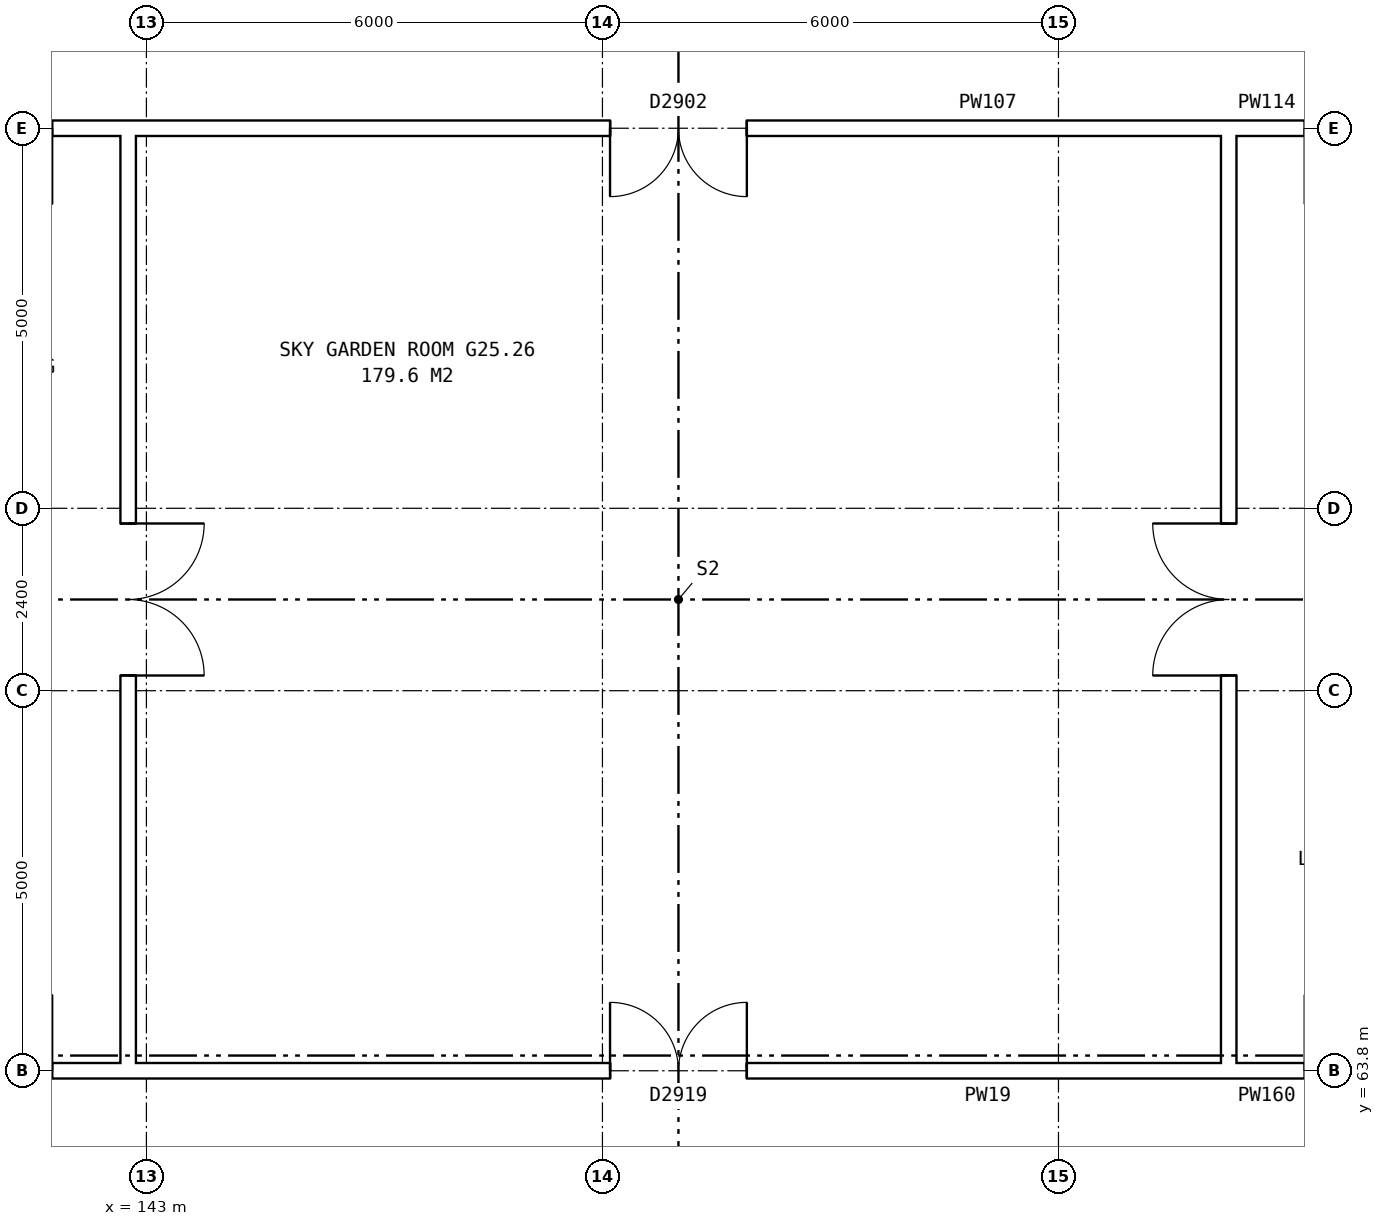
"""IFC4 building model, lengths in metres.
Left out: names, types, materials, properties, quantities, classifications, styles, units other than length and angle.
Written with IfcOpenShell. Run it as: python <this file> out.ifc"""

import sys

from ifc_helpers import new_model, si_unit, direction, frame, frame_2d, origin, place, context, subcontext, project, spatial, rectangle, extrude, element, fill, save


model = new_model("IFC4")
c1 = context("Model", 3, precision=1e-05, world=origin(), true_north=direction((0.0, 1.0)))
c2 = subcontext(c1, "Body", "Model", "MODEL_VIEW")
j1 = project(units=[si_unit("LENGTHUNIT", "METRE"), si_unit("PLANEANGLEUNIT", "RADIAN")], contexts=[c1])
p1 = place(None, origin())
s1 = spatial("IfcSite", under=j1, at=p1, CompositionType="ELEMENT")
p2 = place(p1, origin())
s2 = spatial("IfcBuilding", under=s1, at=p2, CompositionType="ELEMENT")
p3 = place(p2, frame((0.0, 0.0, 90.2)))
s3 = spatial("IfcBuildingStorey", under=s2, at=p3, CompositionType="ELEMENT", Elevation=90.2)
p4 = place(p3, frame((142.76, 63.9, 0.0), z_axis=(0.0, 0.0, 1.0), x_axis=(0.0, 1.0, 0.0)))
e1 = element("IfcWall", 1, at=p4, inside=s3, PredefinedType="PARTITIONING", context=c2, shape_type="SweptSolid", body=[
    extrude(rectangle(XDim=12.2, YDim=0.2, at=frame_2d((6.1, 0.0))), origin(), (0.0, 0.0, 1.0), 5.6),
])
p5 = place(p4, frame((5.1, 0.0, 0.0)))
e2 = element("IfcOpeningElement", 2, at=p5, cuts=e1, PredefinedType="OPENING", context=c2, shape_type="SweptSolid", body=[
    extrude(rectangle(XDim=2.0, YDim=2.1, at=frame_2d((1.0, 1.05))), frame((0.0, 0.11, 0.0), z_axis=(0.0, -1.0, 0.0), x_axis=(1.0, 0.0, 0.0)), (0.0, 0.0, 1.0), 0.22),
])
p6 = place(p3, frame((157.24, 63.9, 0.0), z_axis=(0.0, 0.0, 1.0), x_axis=(0.0, 1.0, 0.0)))
e3 = element("IfcWall", 3, at=p6, inside=s3, PredefinedType="PARTITIONING", context=c2, shape_type="SweptSolid", body=[
    extrude(rectangle(XDim=12.2, YDim=0.2, at=frame_2d((6.1, 0.0))), origin(), (0.0, 0.0, 1.0), 5.6),
])
p7 = place(p6, frame((5.1, 0.0, 0.0)))
e4 = element("IfcOpeningElement", 4, at=p7, cuts=e3, PredefinedType="OPENING", context=c2, shape_type="SweptSolid", body=[
    extrude(rectangle(XDim=2.0, YDim=2.1, at=frame_2d((1.0, 1.05))), frame((0.0, 0.11, 0.0), z_axis=(0.0, -1.0, 0.0), x_axis=(1.0, 0.0, 0.0)), (0.0, 0.0, 1.0), 0.22),
])
p8 = place(p3, frame((142.76, 63.8, 0.0), z_axis=(0.0, 0.0, 1.0), x_axis=(1.0, 0.0, 0.0)))
e5 = element("IfcWall", 5, at=p8, inside=s3, PredefinedType="PARTITIONING", context=c2, shape_type="SweptSolid", body=[
    extrude(rectangle(XDim=14.48, YDim=0.2, at=frame_2d((7.24, 0.0))), origin(), (0.0, 0.0, 1.0), 5.6),
])
p9 = place(p8, frame((6.34, 0.0, 0.0)))
e6 = element("IfcOpeningElement", 6, at=p9, cuts=e5, PredefinedType="OPENING", context=c2, shape_type="SweptSolid", body=[
    extrude(rectangle(XDim=1.8, YDim=2.1, at=frame_2d((0.9, 1.05))), frame((0.0, 0.11, 0.0), z_axis=(0.0, -1.0, 0.0), x_axis=(1.0, 0.0, 0.0)), (0.0, 0.0, 1.0), 0.22),
])
p10 = place(p3, frame((139.76, 63.8, 0.0), z_axis=(0.0, 0.0, 1.0), x_axis=(1.0, 0.0, 0.0)))
e7 = element("IfcWall", 7, at=p10, inside=s3, PredefinedType="PARTITIONING", context=c2, shape_type="SweptSolid", body=[
    extrude(rectangle(XDim=3.0, YDim=0.2, at=frame_2d((1.5, 0.0))), origin(), (0.0, 0.0, 1.0), 5.6),
])
p11 = place(p10, frame((1.0, 0.0, 0.0)))
e8 = element("IfcOpeningElement", 8, at=p11, cuts=e7, PredefinedType="OPENING", context=c2, shape_type="SweptSolid", body=[
    extrude(rectangle(XDim=1.0, YDim=2.1, at=frame_2d((0.5, 1.05))), frame((0.0, 0.11, 0.0), z_axis=(0.0, -1.0, 0.0), x_axis=(1.0, 0.0, 0.0)), (0.0, 0.0, 1.0), 0.22),
])
p12 = place(p3, frame((157.24, 63.8, 0.0), z_axis=(0.0, 0.0, 1.0), x_axis=(1.0, 0.0, 0.0)))
e9 = element("IfcWall", 9, at=p12, inside=s3, PredefinedType="PARTITIONING", context=c2, shape_type="SweptSolid", body=[
    extrude(rectangle(XDim=3.0, YDim=0.2, at=frame_2d((1.5, 0.0))), origin(), (0.0, 0.0, 1.0), 5.6),
])
p13 = place(p12, frame((1.0, 0.0, 0.0)))
e10 = element("IfcOpeningElement", 10, at=p13, cuts=e9, PredefinedType="OPENING", context=c2, shape_type="SweptSolid", body=[
    extrude(rectangle(XDim=1.0, YDim=2.1, at=frame_2d((0.5, 1.05))), frame((0.0, 0.11, 0.0), z_axis=(0.0, -1.0, 0.0), x_axis=(1.0, 0.0, 0.0)), (0.0, 0.0, 1.0), 0.22),
])
p14 = place(p3, frame((142.76, 76.2, 0.0), z_axis=(0.0, 0.0, 1.0), x_axis=(1.0, 0.0, 0.0)))
e11 = element("IfcWall", 11, at=p14, inside=s3, PredefinedType="PARTITIONING", context=c2, shape_type="SweptSolid", body=[
    extrude(rectangle(XDim=14.48, YDim=0.2, at=frame_2d((7.24, 0.0))), origin(), (0.0, 0.0, 1.0), 5.6),
])
p15 = place(p14, frame((6.34, 0.0, 0.0)))
e12 = element("IfcOpeningElement", 12, at=p15, cuts=e11, PredefinedType="OPENING", context=c2, shape_type="SweptSolid", body=[
    extrude(rectangle(XDim=1.8, YDim=2.1, at=frame_2d((0.9, 1.05))), frame((0.0, 0.11, 0.0), z_axis=(0.0, -1.0, 0.0), x_axis=(1.0, 0.0, 0.0)), (0.0, 0.0, 1.0), 0.22),
])
p16 = place(p3, frame((139.76, 76.2, 0.0), z_axis=(0.0, 0.0, 1.0), x_axis=(1.0, 0.0, 0.0)))
e13 = element("IfcWall", 13, at=p16, inside=s3, PredefinedType="PARTITIONING", context=c2, shape_type="SweptSolid", body=[
    extrude(rectangle(XDim=3.0, YDim=0.2, at=frame_2d((1.5, 0.0))), origin(), (0.0, 0.0, 1.0), 5.6),
])
p17 = place(p16, frame((1.0, 0.0, 0.0)))
e14 = element("IfcOpeningElement", 14, at=p17, cuts=e13, PredefinedType="OPENING", context=c2, shape_type="SweptSolid", body=[
    extrude(rectangle(XDim=1.0, YDim=2.1, at=frame_2d((0.5, 1.05))), frame((0.0, 0.11, 0.0), z_axis=(0.0, -1.0, 0.0), x_axis=(1.0, 0.0, 0.0)), (0.0, 0.0, 1.0), 0.22),
])
p18 = place(p3, frame((157.24, 76.2, 0.0), z_axis=(0.0, 0.0, 1.0), x_axis=(1.0, 0.0, 0.0)))
e15 = element("IfcWall", 15, at=p18, inside=s3, PredefinedType="PARTITIONING", context=c2, shape_type="SweptSolid", body=[
    extrude(rectangle(XDim=3.0, YDim=0.2, at=frame_2d((1.5, 0.0))), origin(), (0.0, 0.0, 1.0), 5.6),
])
p19 = place(p18, frame((1.0, 0.0, 0.0)))
e16 = element("IfcOpeningElement", 16, at=p19, cuts=e15, PredefinedType="OPENING", context=c2, shape_type="SweptSolid", body=[
    extrude(rectangle(XDim=1.0, YDim=2.1, at=frame_2d((0.5, 1.05))), frame((0.0, 0.11, 0.0), z_axis=(0.0, -1.0, 0.0), x_axis=(1.0, 0.0, 0.0)), (0.0, 0.0, 1.0), 0.22),
])
p20 = place(p5, frame((2.0, 0.0, 0.0), z_axis=(0.0, 0.0, 1.0), x_axis=(-1.0, 0.0, 0.0)))
e17 = element("IfcDoor", 17, at=p20, inside=s3, OperationType="DOUBLE_DOOR_SINGLE_SWING", PredefinedType="DOOR", context=c2, shape_type="SweptSolid", body=[
    extrude(rectangle(XDim=2.0, YDim=2.1, at=frame_2d((1.0, 1.05))), frame((0.0, 0.025, 0.0), z_axis=(0.0, -1.0, 0.0), x_axis=(1.0, 0.0, 0.0)), (0.0, 0.0, 1.0), 0.05),
])
fill(e2, e17)
p21 = place(p7, origin())
e18 = element("IfcDoor", 18, at=p21, inside=s3, OperationType="DOUBLE_DOOR_SINGLE_SWING", PredefinedType="DOOR", context=c2, shape_type="SweptSolid", body=[
    extrude(rectangle(XDim=2.0, YDim=2.1, at=frame_2d((1.0, 1.05))), frame((0.0, 0.025, 0.0), z_axis=(0.0, -1.0, 0.0), x_axis=(1.0, 0.0, 0.0)), (0.0, 0.0, 1.0), 0.05),
])
fill(e4, e18)
p22 = place(p9, origin())
e19 = element("IfcDoor", 19, at=p22, inside=s3, OperationType="DOUBLE_DOOR_SINGLE_SWING", PredefinedType="DOOR", context=c2, shape_type="SweptSolid", body=[
    extrude(rectangle(XDim=1.8, YDim=2.1, at=frame_2d((0.9, 1.05))), frame((0.0, 0.025, 0.0), z_axis=(0.0, -1.0, 0.0), x_axis=(1.0, 0.0, 0.0)), (0.0, 0.0, 1.0), 0.05),
])
fill(e6, e19)
p23 = place(p15, frame((1.8, 0.0, 0.0), z_axis=(0.0, 0.0, 1.0), x_axis=(-1.0, 0.0, 0.0)))
e20 = element("IfcDoor", 20, at=p23, inside=s3, OperationType="DOUBLE_DOOR_SINGLE_SWING", PredefinedType="DOOR", context=c2, shape_type="SweptSolid", body=[
    extrude(rectangle(XDim=1.8, YDim=2.1, at=frame_2d((0.9, 1.05))), frame((0.0, 0.025, 0.0), z_axis=(0.0, -1.0, 0.0), x_axis=(1.0, 0.0, 0.0)), (0.0, 0.0, 1.0), 0.05),
])
fill(e12, e20)
save(model, sys.argv[1])
